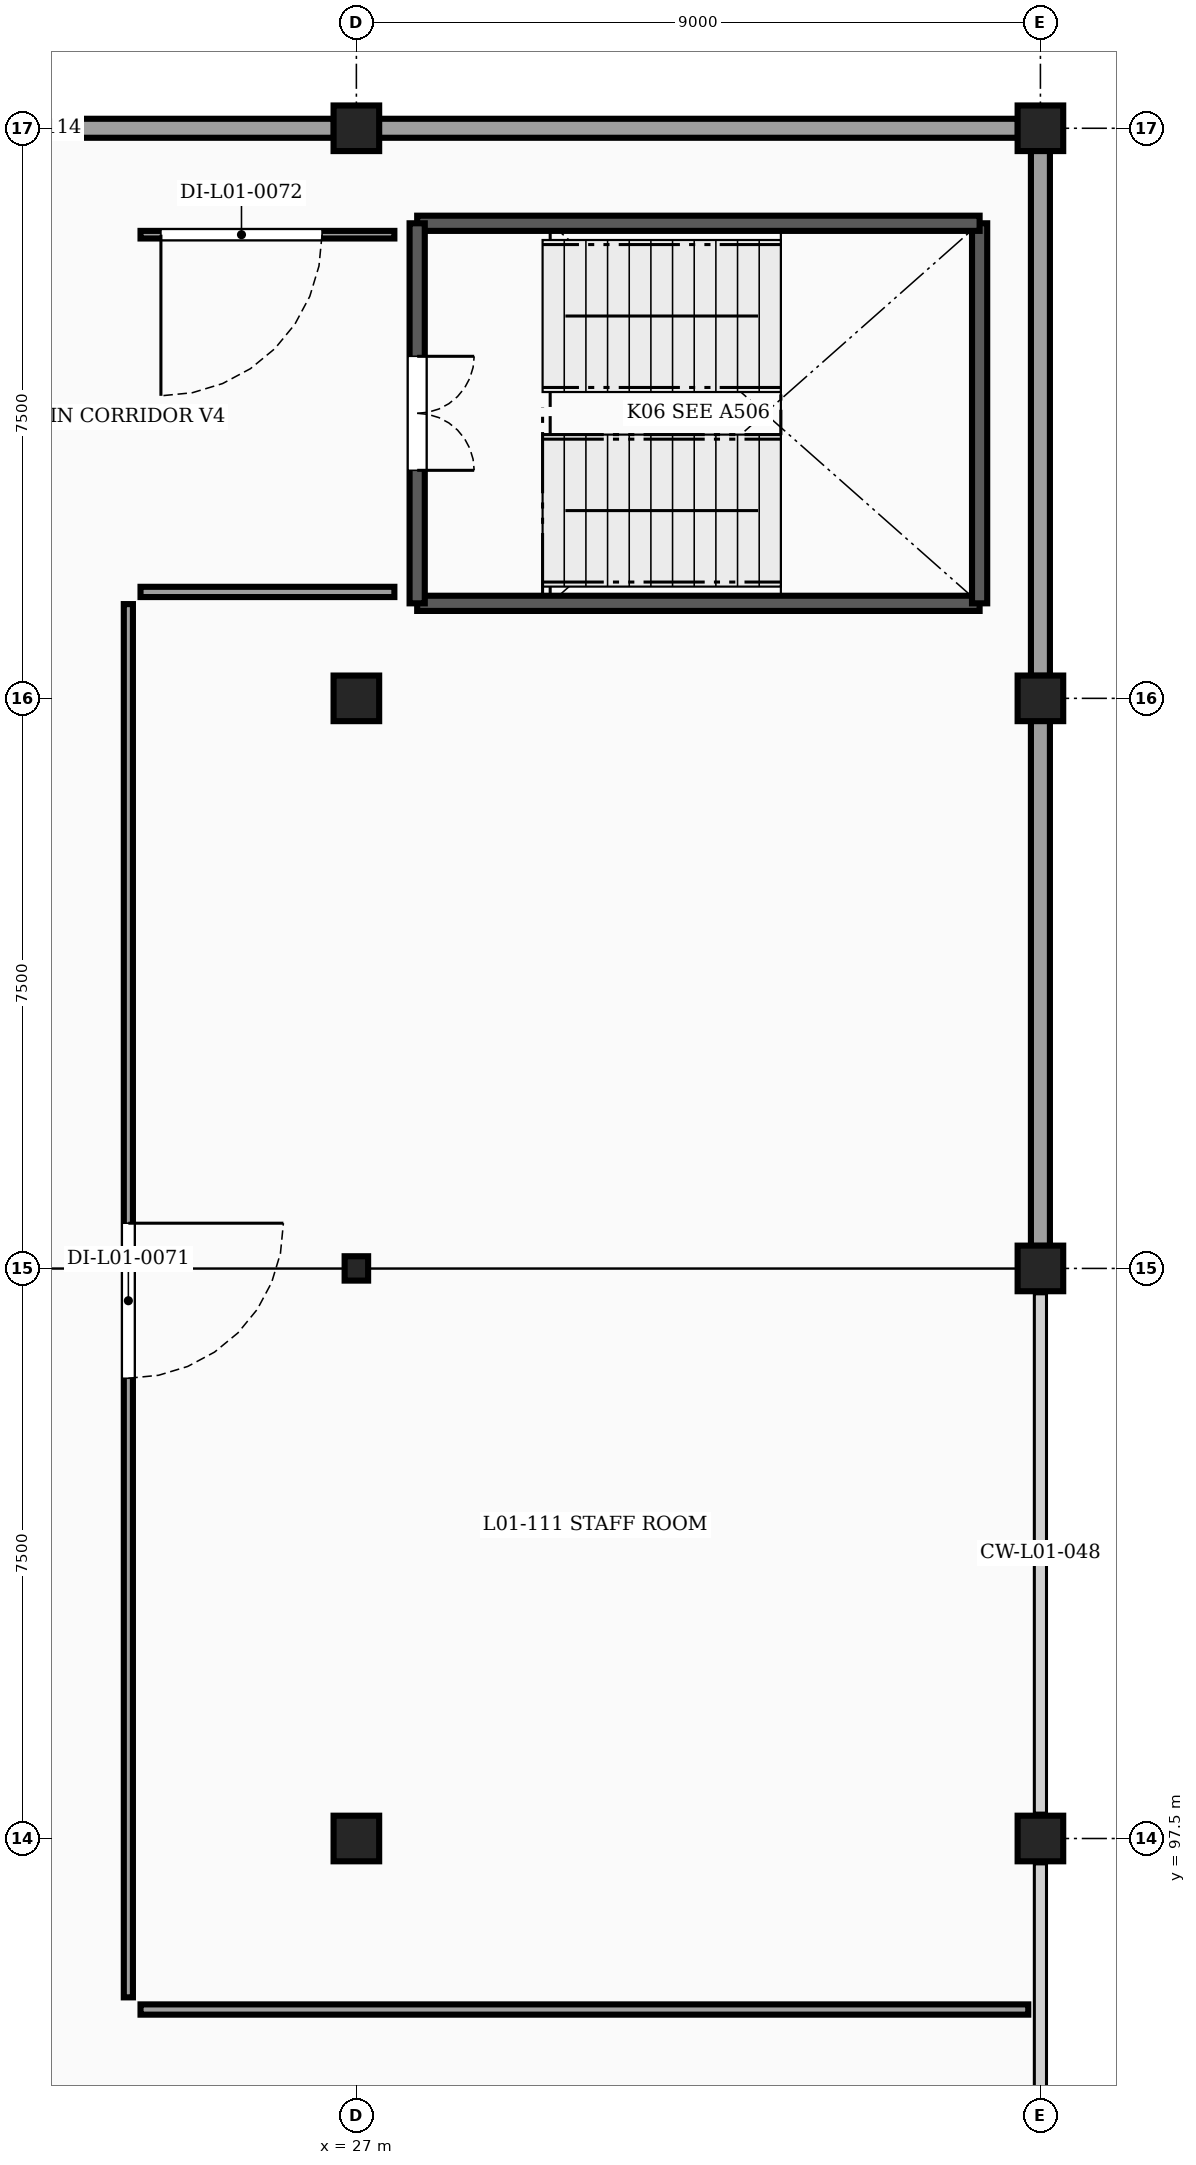
"""IFC4 building model, lengths in metres.
Left out: names, types, materials, properties, quantities, classifications, styles, units other than length and angle.
Written with IfcOpenShell. Run it as: python <this file> out.ifc"""

import sys

from ifc_helpers import new_model, si_unit, direction, frame, frame_2d, origin, origin_2d, place, context, subcontext, project, spatial, rectangle, i_section, extrude, element, fill, save


model = new_model("IFC4")
c1 = context("Model", 3, precision=1e-05, world=origin(), true_north=direction((0.0, 1.0)))
c2 = subcontext(c1, "Body", "Model", "MODEL_VIEW")
j1 = project(units=[si_unit("LENGTHUNIT", "METRE"), si_unit("PLANEANGLEUNIT", "RADIAN")], contexts=[c1])
p1 = place(None, origin())
s1 = spatial("IfcSite", under=j1, at=p1, CompositionType="ELEMENT")
p2 = place(p1, origin())
s2 = spatial("IfcBuilding", under=s1, at=p2, CompositionType="ELEMENT")
p3 = place(p2, frame((0.0, 0.0, 4.5)))
s3 = spatial("IfcBuildingStorey", under=s2, at=p3, CompositionType="ELEMENT", Elevation=4.5)
for number, where, z_axis, x_axis in (
    (1, (27.0, 97.5, 0.0), (0.0, 0.0, 1.0), (1.0, 0.0, 0.0)),
    (2, (36.0, 97.5, 0.0), (0.0, 0.0, 1.0), (1.0, 0.0, 0.0)),
):
    element("IfcColumn", number, at=place(p3, frame(where, z_axis=z_axis, x_axis=x_axis)), inside=s3, PredefinedType="COLUMN", context=c2, shape_type="SweptSolid", body=[
        extrude(rectangle(XDim=0.6, YDim=0.6, at=origin_2d()), origin(), (0.0, 0.0, 1.0), 4.0),
    ])
p4 = place(p3, frame((27.0, 105.0, 0.0), z_axis=(0.0, 0.0, 1.0), x_axis=(1.0, 0.0, 0.0)))
e3 = element("IfcColumn", 3, at=p4, inside=s3, PredefinedType="COLUMN", context=c2, shape_type="SweptSolid", body=[
    extrude(i_section(OverallWidth=0.309, OverallDepth=0.321, WebThickness=0.014, FlangeThickness=0.022, FilletRadius=0.017, at=origin_2d()), origin(), (0.0, 0.0, 1.0), 4.0),
])
for number, where, z_axis, x_axis in (
    (4, (36.0, 105.0, 0.0), (0.0, 0.0, 1.0), (1.0, 0.0, 0.0)),
    (5, (27.0, 112.5, 0.0), (0.0, 0.0, 1.0), (1.0, 0.0, 0.0)),
    (6, (36.0, 112.5, 0.0), (0.0, 0.0, 1.0), (1.0, 0.0, 0.0)),
    (7, (27.0, 120.0, 0.0), (0.0, 0.0, 1.0), (1.0, 0.0, 0.0)),
    (8, (36.0, 120.0, 0.0), (0.0, 0.0, 1.0), (1.0, 0.0, 0.0)),
):
    element("IfcColumn", number, at=place(p3, frame(where, z_axis=z_axis, x_axis=x_axis)), inside=s3, PredefinedType="COLUMN", context=c2, shape_type="SweptSolid", body=[
        extrude(rectangle(XDim=0.6, YDim=0.6, at=origin_2d()), origin(), (0.0, 0.0, 1.0), 4.0),
    ])
for number, where, z_axis, x_axis in (
    (9, (18.296, 120.0, 0.0), (0.0, 0.0, 1.0), (1.0, 0.0, 0.0)),
    (10, (27.296, 120.0, 0.0), (0.0, 0.0, 1.0), (1.0, 0.0, 0.0)),
):
    element("IfcWall", number, at=place(p3, frame(where, z_axis=z_axis, x_axis=x_axis)), inside=s3, PredefinedType="SOLIDWALL", context=c2, shape_type="SweptSolid", body=[
        extrude(rectangle(XDim=8.408, YDim=0.25, at=frame_2d((4.204, 0.0))), origin(), (0.0, 0.0, 1.0), 3.4),
    ])
for number, where, z_axis, x_axis in (
    (11, (36.0, 119.704, 0.0), (0.0, 0.0, 1.0), (0.0, -1.0, 0.0)),
    (12, (36.0, 112.204, 0.0), (0.0, 0.0, 1.0), (0.0, -1.0, 0.0)),
):
    element("IfcWall", number, at=place(p3, frame(where, z_axis=z_axis, x_axis=x_axis)), inside=s3, PredefinedType="SOLIDWALL", context=c2, shape_type="SweptSolid", body=[
        extrude(rectangle(XDim=6.908, YDim=0.25, at=frame_2d((3.454, 0.0))), origin(), (0.0, 0.0, 1.0), 3.4),
    ])
p5 = place(p3, frame((27.8, 113.75, 0.0), z_axis=(0.0, 0.0, 1.0), x_axis=(1.0, 0.0, 0.0)))
e13 = element("IfcWall", 13, at=p5, inside=s3, PredefinedType="SHEAR", context=c2, shape_type="SweptSolid", body=[
    extrude(rectangle(XDim=7.4, YDim=0.2, at=frame_2d((3.7, 0.0))), origin(), (0.0, 0.0, 1.0), 3.76),
])
p6 = place(p3, frame((35.2, 113.75, 0.0), z_axis=(0.0, 0.0, 1.0), x_axis=(0.0, 1.0, 0.0)))
e14 = element("IfcWall", 14, at=p6, inside=s3, PredefinedType="SHEAR", context=c2, shape_type="SweptSolid", body=[
    extrude(rectangle(XDim=5.0, YDim=0.2, at=frame_2d((2.5, 0.0))), origin(), (0.0, 0.0, 1.0), 3.76),
])
p7 = place(p3, frame((35.2, 118.75, 0.0), z_axis=(0.0, 0.0, 1.0), x_axis=(-1.0, 0.0, 0.0)))
e15 = element("IfcWall", 15, at=p7, inside=s3, PredefinedType="SHEAR", context=c2, shape_type="SweptSolid", body=[
    extrude(rectangle(XDim=7.4, YDim=0.2, at=frame_2d((3.7, 0.0))), origin(), (0.0, 0.0, 1.0), 3.76),
])
p8 = place(p3, frame((27.8, 118.75, 0.0), z_axis=(0.0, 0.0, 1.0), x_axis=(0.0, -1.0, 0.0)))
e16 = element("IfcWall", 16, at=p8, inside=s3, PredefinedType="SHEAR", context=c2, shape_type="SweptSolid", body=[
    extrude(rectangle(XDim=5.0, YDim=0.2, at=frame_2d((2.5, 0.0))), origin(), (0.0, 0.0, 1.0), 3.76),
])
p9 = place(p8, frame((1.75, 0.0, 0.0)))
e17 = element("IfcOpeningElement", 17, at=p9, cuts=e16, PredefinedType="OPENING", context=c2, shape_type="SweptSolid", body=[
    extrude(rectangle(XDim=1.5, YDim=2.15, at=frame_2d((0.75, 1.075))), frame((0.0, 0.11, 0.0), z_axis=(0.0, -1.0, 0.0), x_axis=(1.0, 0.0, 0.0)), (0.0, 0.0, 1.0), 0.22),
])
p10 = place(p3, frame((27.5, 113.9, 0.0), z_axis=(0.0, 0.0, 1.0), x_axis=(-1.0, 0.0, 0.0)))
e18 = element("IfcWall", 18, at=p10, inside=s3, PredefinedType="PARTITIONING", context=c2, shape_type="SweptSolid", body=[
    extrude(rectangle(XDim=3.34, YDim=0.135, at=frame_2d((1.67, 0.0))), origin(), (0.0, 0.0, 1.0), 3.76),
])
p11 = place(p3, frame((24.0, 113.74, 0.0), z_axis=(0.0, 0.0, 1.0), x_axis=(0.0, -1.0, 0.0)))
e19 = element("IfcWall", 19, at=p11, inside=s3, PredefinedType="PARTITIONING", context=c2, shape_type="SweptSolid", body=[
    extrude(rectangle(XDim=18.33, YDim=0.12, at=frame_2d((9.165, 0.0))), origin(), (0.0, 0.0, 1.0), 3.302),
])
p12 = place(p11, frame((8.145, 0.0, 0.0)))
e20 = element("IfcOpeningElement", 20, at=p12, cuts=e19, PredefinedType="OPENING", context=c2, shape_type="SweptSolid", body=[
    extrude(rectangle(XDim=2.04, YDim=2.24, at=frame_2d((1.02, 1.12))), frame((0.0, 0.07, 0.0), z_axis=(0.0, -1.0, 0.0), x_axis=(1.0, 0.0, 0.0)), (0.0, 0.0, 1.0), 0.14),
])
p13 = place(p3, frame((24.16, 95.25, 0.0), z_axis=(0.0, 0.0, 1.0), x_axis=(1.0, 0.0, 0.0)))
e21 = element("IfcWall", 21, at=p13, inside=s3, PredefinedType="PARTITIONING", context=c2, shape_type="SweptSolid", body=[
    extrude(rectangle(XDim=11.68, YDim=0.135, at=frame_2d((5.84, 0.0))), origin(), (0.0, 0.0, 1.0), 3.76),
])
p14 = place(p3, frame((27.5, 118.6, 0.0), z_axis=(0.0, 0.0, 1.0), x_axis=(-1.0, 0.0, 0.0)))
e22 = element("IfcWall", 22, at=p14, inside=s3, PredefinedType="PARTITIONING", context=c2, shape_type="SweptSolid", body=[
    extrude(rectangle(XDim=3.34, YDim=0.1, at=frame_2d((1.67, 0.0))), origin(), (0.0, 0.0, 1.0), 3.76),
])
p15 = place(p14, frame((0.952, 0.0, 0.0)))
e23 = element("IfcOpeningElement", 23, at=p15, cuts=e22, PredefinedType="OPENING", context=c2, shape_type="SweptSolid", body=[
    extrude(rectangle(XDim=2.12, YDim=2.24, at=frame_2d((1.06, 1.12))), frame((0.0, 0.06, 0.0), z_axis=(0.0, -1.0, 0.0), x_axis=(1.0, 0.0, 0.0)), (0.0, 0.0, 1.0), 0.12),
])
p16 = place(p9, origin())
e24 = element("IfcDoor", 24, at=p16, inside=s3, OperationType="DOUBLE_DOOR_SINGLE_SWING", PredefinedType="DOOR", context=c2, shape_type="SweptSolid", body=[
    extrude(rectangle(XDim=1.5, YDim=2.15, at=frame_2d((0.75, 1.075))), frame((0.0, 0.025, 0.0), z_axis=(0.0, -1.0, 0.0), x_axis=(1.0, 0.0, 0.0)), (0.0, 0.0, 1.0), 0.05),
])
fill(e17, e24)
p17 = place(p12, origin())
e25 = element("IfcDoor", 25, at=p17, inside=s3, OperationType="SINGLE_SWING_LEFT", PredefinedType="DOOR", context=c2, shape_type="SweptSolid", body=[
    extrude(rectangle(XDim=2.04, YDim=2.24, at=frame_2d((1.02, 1.12))), frame((0.0, 0.025, 0.0), z_axis=(0.0, -1.0, 0.0), x_axis=(1.0, 0.0, 0.0)), (0.0, 0.0, 1.0), 0.05),
])
fill(e20, e25)
p18 = place(p15, origin())
e26 = element("IfcDoor", 26, at=p18, inside=s3, OperationType="SINGLE_SWING_RIGHT", PredefinedType="DOOR", context=c2, shape_type="SweptSolid", body=[
    extrude(rectangle(XDim=2.12, YDim=2.24, at=frame_2d((1.06, 1.12))), frame((0.0, 0.025, 0.0), z_axis=(0.0, -1.0, 0.0), x_axis=(1.0, 0.0, 0.0)), (0.0, 0.0, 1.0), 0.05),
])
fill(e23, e26)
save(model, sys.argv[1])
